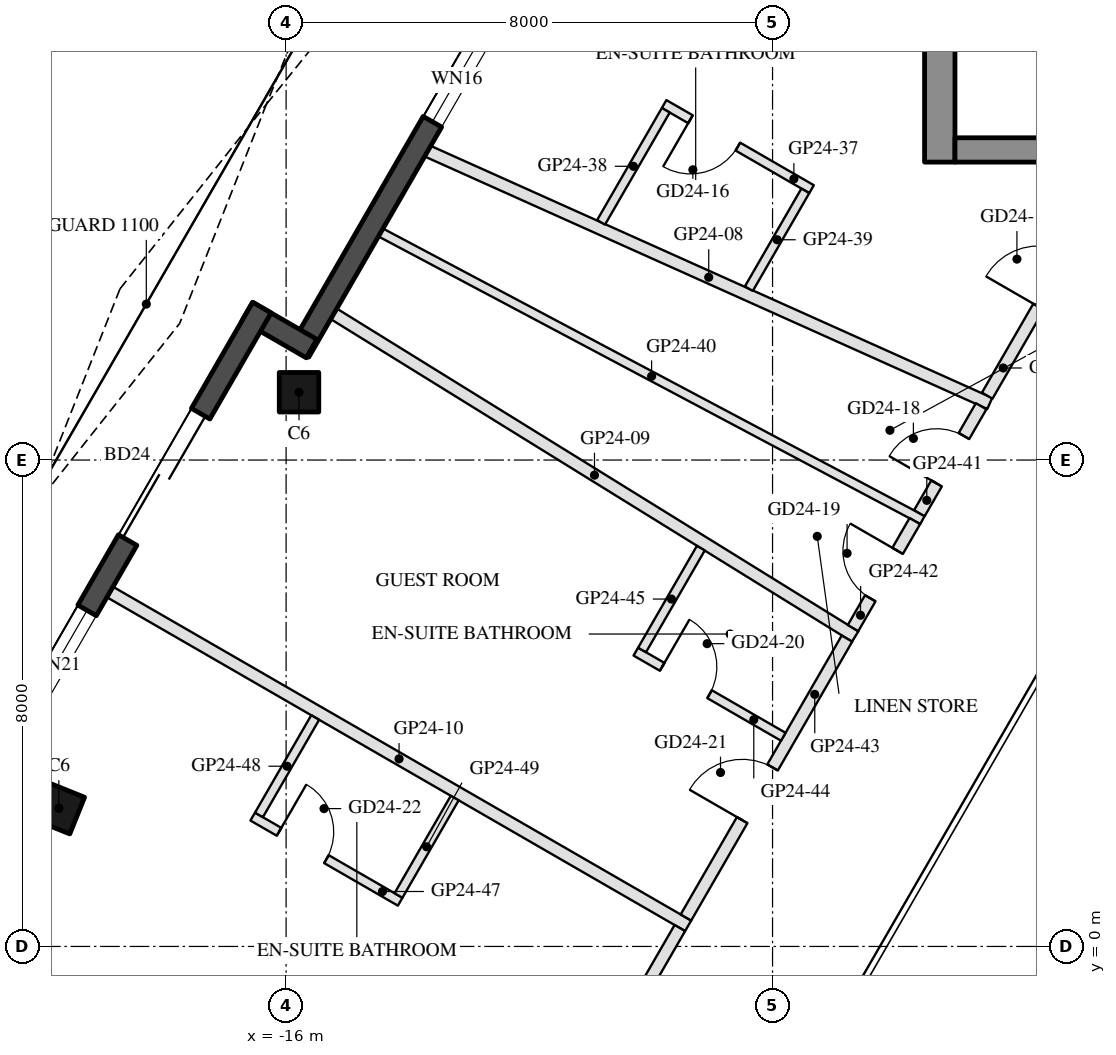
"""IFC4 building model, lengths in metres.
Left out: names, types, materials, properties, quantities, classifications, styles, units other than length and angle.
Written with IfcOpenShell. Run it as: python <this file> out.ifc"""

import sys

from ifc_helpers import new_model, si_unit, direction, frame, frame_2d, origin, origin_2d, place, context, subcontext, project, spatial, rectangle, hollow_rectangle, extrude, boolean, halfspace, element, fill, save


model = new_model("IFC4")
c1 = context("Model", 3, precision=1e-05, world=origin(), true_north=direction((0.0, 1.0)))
c2 = subcontext(c1, "Body", "Model", "MODEL_VIEW")
j1 = project(units=[si_unit("LENGTHUNIT", "METRE"), si_unit("PLANEANGLEUNIT", "RADIAN")], contexts=[c1])
p1 = place(None, origin())
s1 = spatial("IfcSite", under=j1, at=p1, CompositionType="ELEMENT")
p2 = place(p1, origin())
s2 = spatial("IfcBuilding", under=s1, at=p2, CompositionType="ELEMENT")
p3 = place(p2, frame((0.0, 0.0, 254.1)))
s3 = spatial("IfcBuildingStorey", under=s2, at=p3, CompositionType="ELEMENT", Elevation=254.1)
p4 = place(p3, frame((-15.788, 9.115, 0.0), z_axis=(0.131228839908, -0.075723997581, 0.988455799602), x_axis=(-0.499841813697, -0.866116713392, 7.933019e-06)))
e1 = element("IfcColumn", 1, at=p4, inside=s3, PredefinedType="COLUMN", context=c2, shape_type="SweptSolid", body=[
    boolean("DIFFERENCE", boolean("DIFFERENCE", extrude(hollow_rectangle(XDim=0.65, YDim=0.65, WallThickness=0.03, at=origin_2d()), origin(), (0.0, 0.0, 1.0), 3.743), halfspace(frame((0.0, 0.0, 0.037), z_axis=(0.0, 0.0, 1.0), x_axis=(1.0, 0.0, 0.0)), True)), halfspace(frame((0.0, 0.0, 3.706), z_axis=(0.0, 0.0, 1.0), x_axis=(1.0, 0.0, 0.0)), False)),
])
p5 = place(p3, frame((-19.738, 2.273, 0.0), z_axis=(0.161388519526, -0.022915997932, 0.986624854139), x_axis=(-0.495109873729, -0.866696335889, 0.060857820306)))
e2 = element("IfcColumn", 2, at=p5, inside=s3, PredefinedType="COLUMN", context=c2, shape_type="SweptSolid", body=[
    boolean("DIFFERENCE", boolean("DIFFERENCE", extrude(hollow_rectangle(XDim=0.65, YDim=0.65, WallThickness=0.03, at=origin_2d()), origin(), (0.0, 0.0, 1.0), 3.75), halfspace(frame((0.0, 0.0, 0.04), z_axis=(0.0, 0.0, 1.0), x_axis=(1.0, 0.0, 0.0)), True)), halfspace(frame((0.0, 0.0, 3.71), z_axis=(0.0, 0.0, 1.0), x_axis=(1.0, 0.0, 0.0)), False)),
])
p6 = place(p3, frame((-12.409, 15.617, 0.0), z_axis=(0.0, 0.0, 1.0), x_axis=(-0.500003597184, -0.866023326939, 0.0)))
e3 = element("IfcWall", 3, at=p6, inside=s3, PredefinedType="SOLIDWALL", context=c2, shape_type="SweptSolid", body=[
    extrude(rectangle(XDim=6.74, YDim=0.35, at=frame_2d((3.37, 0.0))), origin(), (0.0, 0.0, 1.0), 3.55),
])
p7 = place(p6, frame((0.77, 0.0, 0.3)))
e4 = element("IfcOpeningElement", 4, at=p7, cuts=e3, PredefinedType="OPENING", context=c2, shape_type="SweptSolid", body=[
    extrude(rectangle(XDim=1.6, YDim=2.65, at=frame_2d((0.8, 1.325))), frame((0.0, 0.185, 0.0), z_axis=(0.0, -1.0, 0.0), x_axis=(1.0, 0.0, 0.0)), (0.0, 0.0, 1.0), 0.37),
])
p8 = place(p3, frame((-15.581, 9.833, 0.0), z_axis=(0.0, 0.0, 1.0), x_axis=(-0.866055662726, 0.499947586314, 0.0)))
e5 = element("IfcWall", 5, at=p8, inside=s3, PredefinedType="SOLIDWALL", context=c2, shape_type="SweptSolid", body=[
    extrude(rectangle(XDim=1.22, YDim=0.35, at=frame_2d((0.61, 0.0))), origin(), (0.0, 0.0, 1.0), 3.55),
])
p9 = place(p3, frame((-16.398, 10.507, 0.0), z_axis=(0.0, 0.0, 1.0), x_axis=(-0.499999142773, -0.866025898704, 0.0)))
e6 = element("IfcWall", 6, at=p9, inside=s3, PredefinedType="SOLIDWALL", context=c2, shape_type="SweptSolid", body=[
    extrude(rectangle(XDim=9.7, YDim=0.35, at=frame_2d((4.85, 0.0))), origin(), (0.0, 0.0, 1.0), 3.55),
])
p10 = place(p9, frame((2.014, 0.0, 0.0)))
e7 = element("IfcOpeningElement", 7, at=p10, cuts=e6, PredefinedType="OPENING", context=c2, shape_type="SweptSolid", body=[
    extrude(rectangle(XDim=2.4, YDim=2.4, at=frame_2d((1.2, 1.2))), frame((0.0, 0.185, 0.0), z_axis=(0.0, -1.0, 0.0), x_axis=(1.0, 0.0, 0.0)), (0.0, 0.0, 1.0), 0.37),
])
p11 = place(p9, frame((5.75, 0.0, 0.3)))
e8 = element("IfcOpeningElement", 8, at=p11, cuts=e6, PredefinedType="OPENING", context=c2, shape_type="SweptSolid", body=[
    extrude(rectangle(XDim=2.1, YDim=2.65, at=frame_2d((1.05, 1.325))), frame((0.0, 0.185, 0.0), z_axis=(0.0, -1.0, 0.0), x_axis=(1.0, 0.0, 0.0)), (0.0, 0.0, 1.0), 0.37),
])
p12 = place(p3, frame((-5.25, 12.9, 0.0), z_axis=(0.0, 0.0, 1.0), x_axis=(0.0, 1.0, 0.0)))
e9 = element("IfcWall", 9, at=p12, inside=s3, PredefinedType="SHEAR", context=c2, shape_type="SweptSolid", body=[
    extrude(rectangle(XDim=14.837, YDim=0.5, at=frame_2d((7.418, 0.0))), origin(), (0.0, 0.0, 1.0), 3.5),
])
p13 = place(p3, frame((5.0, 13.1, 0.0), z_axis=(0.0, 0.0, 1.0), x_axis=(-1.0, 0.0, 0.0)))
e10 = element("IfcWall", 10, at=p13, inside=s3, PredefinedType="SHEAR", context=c2, shape_type="SweptSolid", body=[
    extrude(rectangle(XDim=10.0, YDim=0.4, at=frame_2d((5.0, 0.0))), origin(), (0.0, 0.0, 1.0), 3.5),
])
p14 = place(p13, frame((3.55, 0.0, 0.0)))
e11 = element("IfcOpeningElement", 11, at=p14, cuts=e10, PredefinedType="OPENING", context=c2, shape_type="SweptSolid", body=[
    extrude(rectangle(XDim=1.1, YDim=2.1, at=frame_2d((0.55, 1.05))), frame((0.0, 0.21, 0.0), z_axis=(0.0, -1.0, 0.0), x_axis=(1.0, 0.0, 0.0)), (0.0, 0.0, 1.0), 0.42),
])
p15 = place(p13, frame((5.85, 0.0, 0.0)))
e12 = element("IfcOpeningElement", 12, at=p15, cuts=e10, PredefinedType="OPENING", context=c2, shape_type="SweptSolid", body=[
    extrude(rectangle(XDim=1.4, YDim=2.1, at=frame_2d((0.7, 1.05))), frame((0.0, 0.21, 0.0), z_axis=(0.0, -1.0, 0.0), x_axis=(1.0, 0.0, 0.0)), (0.0, 0.0, 1.0), 0.42),
])
p16 = place(p3, frame((-13.672, 13.08, 0.0), z_axis=(0.0, 0.0, 1.0), x_axis=(0.912311972773, -0.409495866077, 0.0)))
e13 = element("IfcWall", 13, at=p16, inside=s3, PredefinedType="PARTITIONING", context=c2, shape_type="SweptSolid", body=[
    extrude(rectangle(XDim=10.132, YDim=0.2, at=frame_2d((5.066, 0.0))), origin(), (0.0, 0.0, 1.0), 3.1),
])
p17 = place(p3, frame((-15.216, 10.405, 0.0), z_axis=(0.0, 0.0, 1.0), x_axis=(0.85032395783, -0.52625960014, 0.0)))
e14 = element("IfcWall", 14, at=p17, inside=s3, PredefinedType="PARTITIONING", context=c2, shape_type="SweptSolid", body=[
    extrude(rectangle(XDim=10.085, YDim=0.2, at=frame_2d((5.042, 0.0))), origin(), (0.0, 0.0, 1.0), 3.1),
])
p18 = place(p3, frame((-18.897, 5.83, 0.0), z_axis=(0.0, 0.0, 1.0), x_axis=(0.866027479907, -0.499996404033, 0.0)))
e15 = element("IfcWall", 15, at=p18, inside=s3, PredefinedType="PARTITIONING", context=c2, shape_type="SweptSolid", body=[
    extrude(rectangle(XDim=10.98, YDim=0.2, at=frame_2d((5.49, 0.0))), origin(), (0.0, 0.0, 1.0), 3.1),
])
p19 = place(p3, frame((-4.469, 9.059, 0.0), z_axis=(0.0, 0.0, 1.0), x_axis=(0.499996027077, 0.86602769754, 0.0)))
e16 = element("IfcWall", 16, at=p19, inside=s3, PredefinedType="PARTITIONING", context=c2, shape_type="SweptSolid", body=[
    extrude(rectangle(XDim=4.377, YDim=0.2, at=frame_2d((2.189, 0.0))), origin(), (0.0, 0.0, 1.0), 3.0),
])
p20 = place(p19, frame((1.689, 0.0, 0.0)))
e17 = element("IfcOpeningElement", 17, at=p20, cuts=e16, PredefinedType="OPENING", context=c2, shape_type="SweptSolid", body=[
    extrude(rectangle(XDim=1.0, YDim=2.1, at=frame_2d((0.5, 1.05))), frame((0.0, 0.11, 0.0), z_axis=(0.0, -1.0, 0.0), x_axis=(1.0, 0.0, 0.0)), (0.0, 0.0, 1.0), 0.22),
])
p21 = place(p3, frame((-7.358, 12.455, 0.0), z_axis=(0.0, 0.0, 1.0), x_axis=(-0.866034573852, 0.49998411664, 0.0)))
e18 = element("IfcWall", 18, at=p21, inside=s3, PredefinedType="PARTITIONING", context=c2, shape_type="SweptSolid", body=[
    extrude(rectangle(XDim=2.8, YDim=0.15, at=frame_2d((1.4, 0.0))), origin(), (0.0, 0.0, 1.0), 3.55),
])
p22 = place(p21, frame((1.4, 0.0, 0.0)))
e19 = element("IfcOpeningElement", 19, at=p22, cuts=e18, PredefinedType="OPENING", context=c2, shape_type="SweptSolid", body=[
    extrude(rectangle(XDim=0.9, YDim=2.1, at=frame_2d((0.45, 1.05))), frame((0.0, 0.085, 0.0), z_axis=(0.0, -1.0, 0.0), x_axis=(1.0, 0.0, 0.0)), (0.0, 0.0, 1.0), 0.17),
])
p23 = place(p3, frame((-9.756, 13.752, 0.0), z_axis=(0.0, 0.0, 1.0), x_axis=(-0.50001378257, -0.866017446268, 0.0)))
e20 = element("IfcWall", 20, at=p23, inside=s3, PredefinedType="PARTITIONING", context=c2, shape_type="SweptSolid", body=[
    extrude(rectangle(XDim=2.128, YDim=0.15, at=frame_2d((1.064, 0.0))), origin(), (0.0, 0.0, 1.0), 3.55),
])
p24 = place(p3, frame((-7.461, 12.427, 0.0), z_axis=(0.0, 0.0, 1.0), x_axis=(-0.500025795397, -0.866010510293, 0.0)))
e21 = element("IfcWall", 21, at=p24, inside=s3, PredefinedType="PARTITIONING", context=c2, shape_type="SweptSolid", body=[
    extrude(rectangle(XDim=1.858, YDim=0.15, at=frame_2d((0.929, 0.0))), origin(), (0.0, 0.0, 1.0), 3.55),
])
p25 = place(p3, frame((-14.444, 11.742, 0.0), z_axis=(0.0, 0.0, 1.0), x_axis=(0.88333061271, -0.468750497225, 0.0)))
e22 = element("IfcWall", 22, at=p25, inside=s3, PredefinedType="PARTITIONING", context=c2, shape_type="SweptSolid", body=[
    extrude(rectangle(XDim=10.086, YDim=0.15, at=frame_2d((5.043, 0.0))), origin(), (0.0, 0.0, 1.0), 3.1),
])
p26 = place(p3, frame((-5.585, 7.126, 0.0), z_axis=(0.0, 0.0, 1.0), x_axis=(0.499927092639, 0.866067492777, 0.0)))
e23 = element("IfcWall", 23, at=p26, inside=s3, PredefinedType="PARTITIONING", context=c2, shape_type="SweptSolid", body=[
    extrude(rectangle(XDim=2.031, YDim=0.2, at=frame_2d((1.016, 0.0))), origin(), (0.0, 0.0, 1.0), 3.0),
])
p27 = place(p26, frame((0.566, 0.0, 0.0)))
e24 = element("IfcOpeningElement", 24, at=p27, cuts=e23, PredefinedType="OPENING", context=c2, shape_type="SweptSolid", body=[
    extrude(rectangle(XDim=0.9, YDim=2.1, at=frame_2d((0.45, 1.05))), frame((0.0, 0.11, 0.0), z_axis=(0.0, -1.0, 0.0), x_axis=(1.0, 0.0, 0.0)), (0.0, 0.0, 1.0), 0.22),
])
p28 = place(p3, frame((-6.676, 5.237, 0.0), z_axis=(0.0, 0.0, 1.0), x_axis=(0.499913168514, 0.866075530163, 0.0)))
e25 = element("IfcWall", 25, at=p28, inside=s3, PredefinedType="PARTITIONING", context=c2, shape_type="SweptSolid", body=[
    extrude(rectangle(XDim=2.031, YDim=0.2, at=frame_2d((1.016, 0.0))), origin(), (0.0, 0.0, 1.0), 3.55),
])
p29 = place(p28, frame((0.566, 0.0, 0.0)))
e26 = element("IfcOpeningElement", 26, at=p29, cuts=e25, PredefinedType="OPENING", context=c2, shape_type="SweptSolid", body=[
    extrude(rectangle(XDim=0.9, YDim=2.1, at=frame_2d((0.45, 1.05))), frame((0.0, 0.11, 0.0), z_axis=(0.0, -1.0, 0.0), x_axis=(1.0, 0.0, 0.0)), (0.0, 0.0, 1.0), 0.22),
])
p30 = place(p3, frame((-9.425, 0.476, 0.0), z_axis=(0.0, 0.0, 1.0), x_axis=(0.500005731256, 0.866022094817, 0.0)))
e27 = element("IfcWall", 27, at=p30, inside=s3, PredefinedType="PARTITIONING", context=c2, shape_type="SweptSolid", body=[
    extrude(rectangle(XDim=5.297, YDim=0.2, at=frame_2d((2.648, 0.0))), origin(), (0.0, 0.0, 1.0), 3.0),
])
p31 = place(p30, frame((1.85, 0.0, 0.0)))
e28 = element("IfcOpeningElement", 28, at=p31, cuts=e27, PredefinedType="OPENING", context=c2, shape_type="SweptSolid", body=[
    extrude(rectangle(XDim=1.0, YDim=2.1, at=frame_2d((0.5, 1.05))), frame((0.0, 0.11, 0.0), z_axis=(0.0, -1.0, 0.0), x_axis=(1.0, 0.0, 0.0)), (0.0, 0.0, 1.0), 0.22),
])
p32 = place(p3, frame((-10.249, 4.849, 0.0), z_axis=(0.0, 0.0, 1.0), x_axis=(0.866034573852, -0.49998411664, 0.0)))
e29 = element("IfcWall", 29, at=p32, inside=s3, PredefinedType="PARTITIONING", context=c2, shape_type="SweptSolid", body=[
    extrude(rectangle(XDim=2.8, YDim=0.15, at=frame_2d((1.4, 0.0))), origin(), (0.0, 0.0, 1.0), 3.55),
])
p33 = place(p32, frame((0.5, 0.0, 0.0)))
e30 = element("IfcOpeningElement", 30, at=p33, cuts=e29, PredefinedType="OPENING", context=c2, shape_type="SweptSolid", body=[
    extrude(rectangle(XDim=0.9, YDim=2.1, at=frame_2d((0.45, 1.05))), frame((0.0, 0.085, 0.0), z_axis=(0.0, -1.0, 0.0), x_axis=(1.0, 0.0, 0.0)), (0.0, 0.0, 1.0), 0.17),
])
p34 = place(p3, frame((-9.179, 6.551, 0.0), z_axis=(0.0, 0.0, 1.0), x_axis=(-0.499995691662, -0.86602789119, 0.0)))
e31 = element("IfcWall", 31, at=p34, inside=s3, PredefinedType="PARTITIONING", context=c2, shape_type="SweptSolid", body=[
    extrude(rectangle(XDim=1.934, YDim=0.15, at=frame_2d((0.967, 0.0))), origin(), (0.0, 0.0, 1.0), 3.0),
])
p35 = place(p3, frame((-12.269, -4.45, 0.0), z_axis=(0.0, 0.0, 1.0), x_axis=(0.500004836318, 0.866022611517, 0.0)))
e32 = element("IfcWall", 32, at=p35, inside=s3, PredefinedType="PARTITIONING", context=c2, shape_type="SweptSolid", body=[
    extrude(rectangle(XDim=5.488, YDim=0.2, at=frame_2d((2.744, 0.0))), origin(), (0.0, 0.0, 1.0), 3.0),
])
p36 = place(p35, frame((2.244, 0.0, 0.0)))
e33 = element("IfcOpeningElement", 33, at=p36, cuts=e32, PredefinedType="OPENING", context=c2, shape_type="SweptSolid", body=[
    extrude(rectangle(XDim=1.0, YDim=2.1, at=frame_2d((0.5, 1.05))), frame((0.0, 0.11, 0.0), z_axis=(0.0, -1.0, 0.0), x_axis=(1.0, 0.0, 0.0)), (0.0, 0.0, 1.0), 0.22),
])
p37 = place(p3, frame((-16.549, 2.136, 0.0), z_axis=(0.0, 0.0, 1.0), x_axis=(0.866034573852, -0.49998411664, 0.0)))
e34 = element("IfcWall", 34, at=p37, inside=s3, PredefinedType="PARTITIONING", context=c2, shape_type="SweptSolid", body=[
    extrude(rectangle(XDim=2.8, YDim=0.15, at=frame_2d((1.4, 0.0))), origin(), (0.0, 0.0, 1.0), 3.55),
])
p38 = place(p37, frame((0.5, 0.0, 0.0)))
e35 = element("IfcOpeningElement", 35, at=p38, cuts=e34, PredefinedType="OPENING", context=c2, shape_type="SweptSolid", body=[
    extrude(rectangle(XDim=0.9, YDim=2.1, at=frame_2d((0.45, 1.05))), frame((0.0, 0.085, 0.0), z_axis=(0.0, -1.0, 0.0), x_axis=(1.0, 0.0, 0.0)), (0.0, 0.0, 1.0), 0.17),
])
for number, where, z_axis, x_axis in (
    (36, (-15.522, 3.765, 0.0), (0.0, 0.0, 1.0), (-0.5, -0.866, 0.0)),
    (37, (-13.227, 2.44, 0.0), (0.0, 0.0, 1.0), (-0.5, -0.866, 0.0)),
):
    element("IfcWall", number, at=place(p3, frame(where, z_axis=z_axis, x_axis=x_axis)), inside=s3, PredefinedType="PARTITIONING", context=c2, shape_type="SweptSolid", body=[
        extrude(rectangle(XDim=1.85, YDim=0.15, at=frame_2d((0.925, 0.0))), origin(), (0.0, 0.0, 1.0), 3.55),
    ])
p39 = place(p7, origin())
e38 = element("IfcWindow", 38, at=p39, inside=s3, PartitioningType="SINGLE_PANEL", PredefinedType="WINDOW", context=c2, shape_type="SweptSolid", body=[
    extrude(rectangle(XDim=1.6, YDim=2.65, at=frame_2d((0.8, 1.325))), frame((0.0, 0.03, 0.0), z_axis=(0.0, -1.0, 0.0), x_axis=(1.0, 0.0, 0.0)), (0.0, 0.0, 1.0), 0.06),
])
fill(e4, e38)
p40 = place(p10, frame((2.4, 0.0, 0.0), z_axis=(0.0, 0.0, 1.0), x_axis=(-1.0, 0.0, 0.0)))
e39 = element("IfcDoor", 39, at=p40, inside=s3, OperationType="SLIDING_TO_LEFT", PredefinedType="DOOR", context=c2, shape_type="SweptSolid", body=[
    extrude(rectangle(XDim=2.4, YDim=2.4, at=frame_2d((1.2, 1.2))), frame((0.0, 0.025, 0.0), z_axis=(0.0, -1.0, 0.0), x_axis=(1.0, 0.0, 0.0)), (0.0, 0.0, 1.0), 0.05),
])
fill(e7, e39)
p41 = place(p11, origin())
e40 = element("IfcWindow", 40, at=p41, inside=s3, PartitioningType="SINGLE_PANEL", PredefinedType="WINDOW", context=c2, shape_type="SweptSolid", body=[
    extrude(rectangle(XDim=2.1, YDim=2.65, at=frame_2d((1.05, 1.325))), frame((0.0, 0.03, 0.0), z_axis=(0.0, -1.0, 0.0), x_axis=(1.0, 0.0, 0.0)), (0.0, 0.0, 1.0), 0.06),
])
fill(e8, e40)
p42 = place(p22, origin())
e41 = element("IfcDoor", 41, at=p42, inside=s3, OperationType="SINGLE_SWING_RIGHT", PredefinedType="DOOR", context=c2, shape_type="SweptSolid", body=[
    extrude(rectangle(XDim=0.9, YDim=2.1, at=frame_2d((0.45, 1.05))), frame((0.0, 0.025, 0.0), z_axis=(0.0, -1.0, 0.0), x_axis=(1.0, 0.0, 0.0)), (0.0, 0.0, 1.0), 0.05),
])
fill(e19, e41)
p43 = place(p27, origin())
e42 = element("IfcDoor", 42, at=p43, inside=s3, OperationType="SINGLE_SWING_LEFT", PredefinedType="DOOR", context=c2, shape_type="SweptSolid", body=[
    extrude(rectangle(XDim=0.9, YDim=2.1, at=frame_2d((0.45, 1.05))), frame((0.0, 0.025, 0.0), z_axis=(0.0, -1.0, 0.0), x_axis=(1.0, 0.0, 0.0)), (0.0, 0.0, 1.0), 0.05),
])
fill(e24, e42)
p44 = place(p29, origin())
e43 = element("IfcDoor", 43, at=p44, inside=s3, OperationType="SINGLE_SWING_RIGHT", PredefinedType="DOOR", context=c2, shape_type="SweptSolid", body=[
    extrude(rectangle(XDim=0.9, YDim=2.1, at=frame_2d((0.45, 1.05))), frame((0.0, 0.025, 0.0), z_axis=(0.0, -1.0, 0.0), x_axis=(1.0, 0.0, 0.0)), (0.0, 0.0, 1.0), 0.05),
])
fill(e26, e43)
p45 = place(p33, origin())
e44 = element("IfcDoor", 44, at=p45, inside=s3, OperationType="SINGLE_SWING_LEFT", PredefinedType="DOOR", context=c2, shape_type="SweptSolid", body=[
    extrude(rectangle(XDim=0.9, YDim=2.1, at=frame_2d((0.45, 1.05))), frame((0.0, 0.025, 0.0), z_axis=(0.0, -1.0, 0.0), x_axis=(1.0, 0.0, 0.0)), (0.0, 0.0, 1.0), 0.05),
])
fill(e30, e44)
p46 = place(p31, origin())
e45 = element("IfcDoor", 45, at=p46, inside=s3, OperationType="SINGLE_SWING_LEFT", PredefinedType="DOOR", context=c2, shape_type="SweptSolid", body=[
    extrude(rectangle(XDim=1.0, YDim=2.1, at=frame_2d((0.5, 1.05))), frame((0.0, 0.025, 0.0), z_axis=(0.0, -1.0, 0.0), x_axis=(1.0, 0.0, 0.0)), (0.0, 0.0, 1.0), 0.05),
])
fill(e28, e45)
p47 = place(p38, origin())
e46 = element("IfcDoor", 46, at=p47, inside=s3, OperationType="SINGLE_SWING_LEFT", PredefinedType="DOOR", context=c2, shape_type="SweptSolid", body=[
    extrude(rectangle(XDim=0.9, YDim=2.1, at=frame_2d((0.45, 1.05))), frame((0.0, 0.025, 0.0), z_axis=(0.0, -1.0, 0.0), x_axis=(1.0, 0.0, 0.0)), (0.0, 0.0, 1.0), 0.05),
])
fill(e35, e46)
save(model, sys.argv[1])
